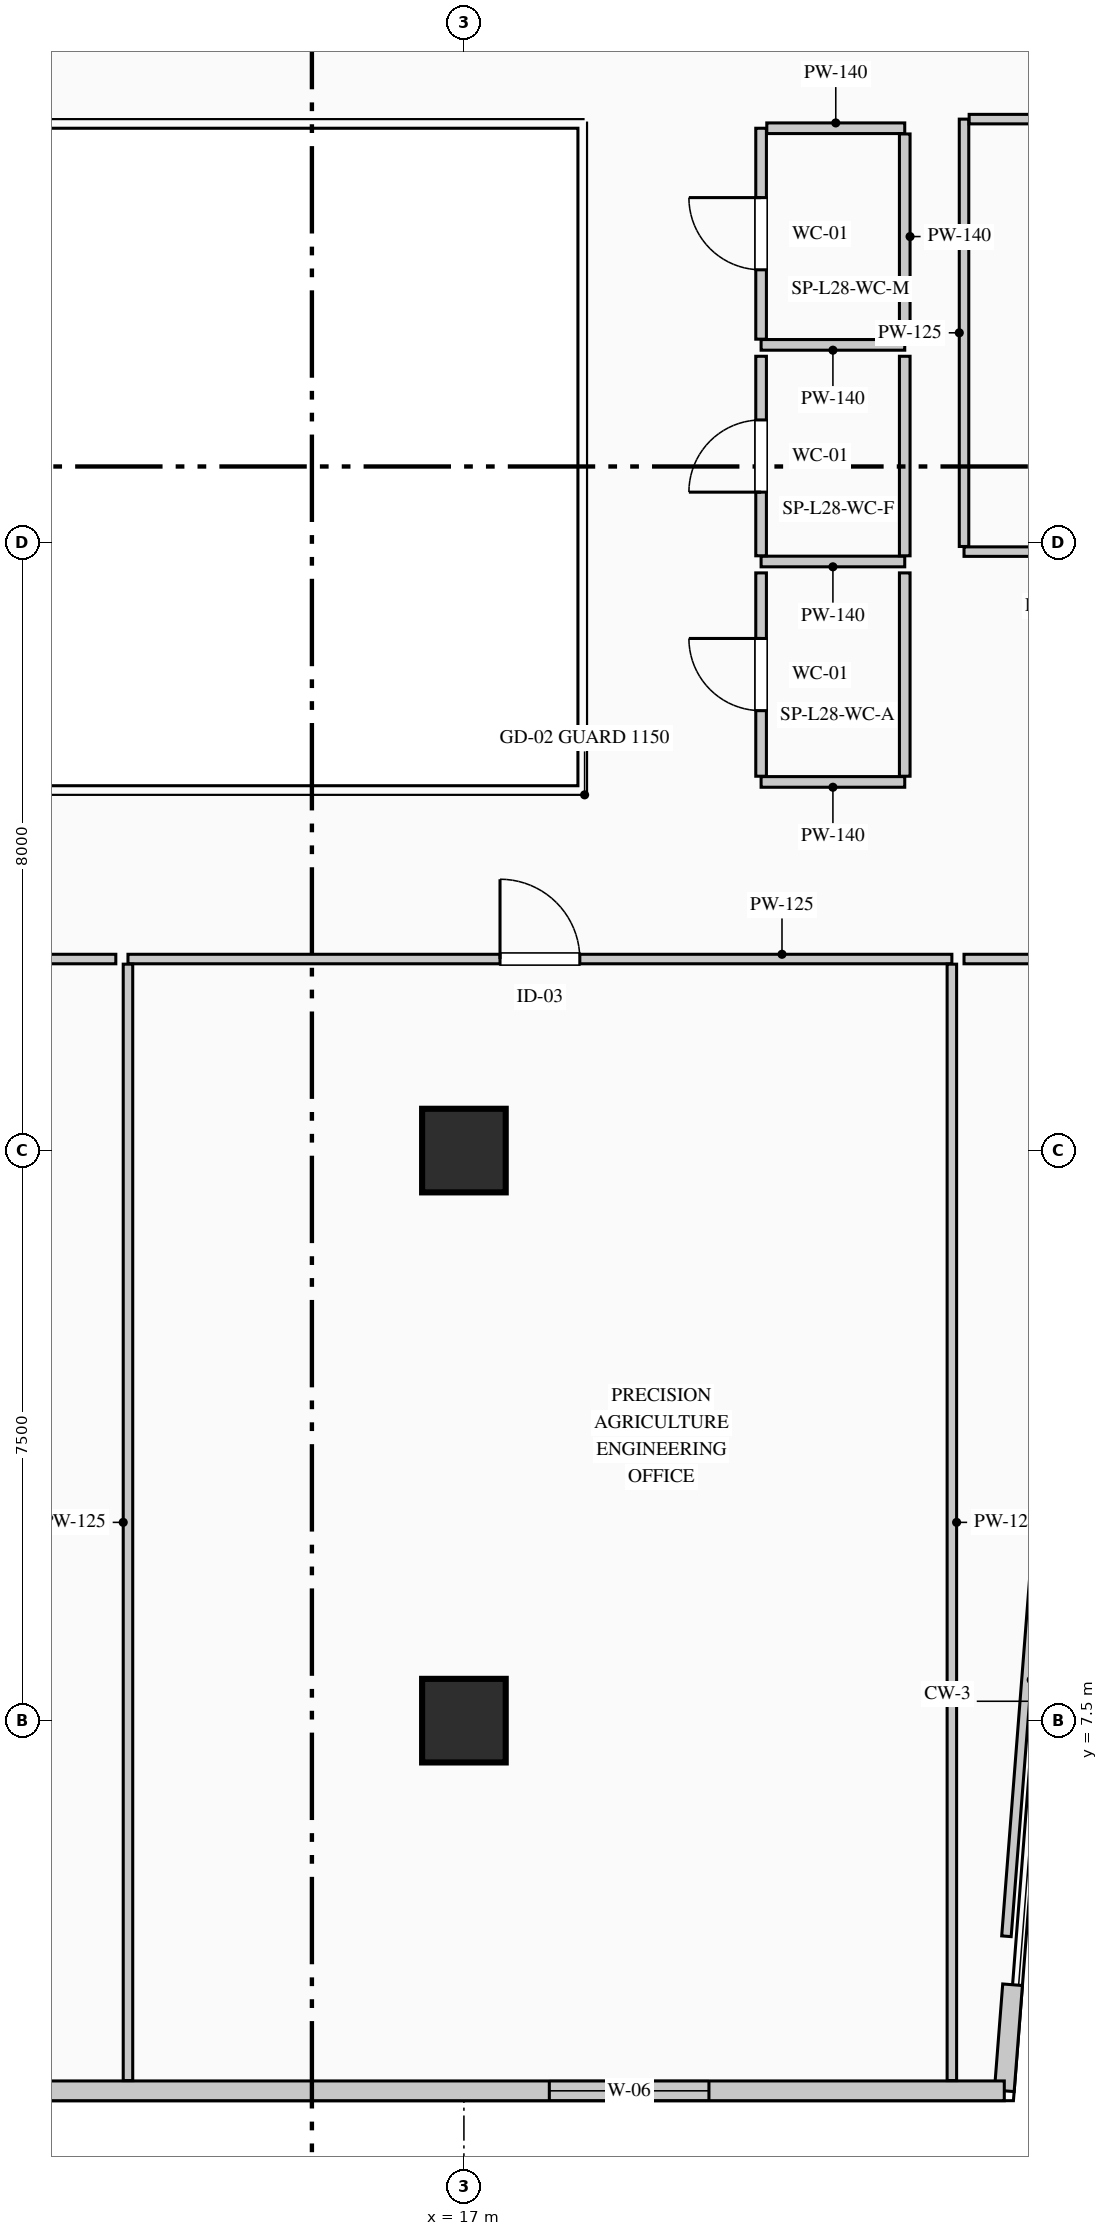
"""IFC4 building model, lengths in metres.
Left out: names, types, materials, properties, quantities, classifications, styles, units other than length and angle.
Written with IfcOpenShell. Run it as: python <this file> out.ifc"""

import sys

from ifc_helpers import new_model, si_unit, direction, frame, frame_2d, origin, origin_2d, place, context, subcontext, project, spatial, rectangle, extrude, element, fill, save


model = new_model("IFC4")
c1 = context("Model", 3, precision=1e-05, world=origin(), true_north=direction((0.0, 1.0)))
c2 = subcontext(c1, "Body", "Model", "MODEL_VIEW")
j1 = project(units=[si_unit("LENGTHUNIT", "METRE"), si_unit("PLANEANGLEUNIT", "RADIAN")], contexts=[c1])
p1 = place(None, origin())
s1 = spatial("IfcSite", under=j1, at=p1, CompositionType="ELEMENT")
p2 = place(p1, origin())
s2 = spatial("IfcBuilding", under=s1, at=p2, CompositionType="ELEMENT")
p3 = place(p2, frame((0.0, 0.0, 123.25)))
s3 = spatial("IfcBuildingStorey", under=s2, at=p3, CompositionType="ELEMENT", Elevation=123.25)
for number, where, z_axis, x_axis in (
    (1, (17.0, 7.5, 0.0), (0.0, 0.0, 1.0), (1.0, 0.0, 0.0)),
    (2, (17.0, 15.0, 0.0), (0.0, 0.0, 1.0), (1.0, 0.0, 0.0)),
):
    element("IfcColumn", number, at=place(p3, frame(where, z_axis=z_axis, x_axis=x_axis)), inside=s3, PredefinedType="COLUMN", context=c2, shape_type="SweptSolid", body=[
        extrude(rectangle(XDim=1.1, YDim=1.1, at=origin_2d()), origin(), (0.0, 0.0, 1.0), 3.95),
    ])
p4 = place(p3, frame((24.219, 4.026, 0.0), z_axis=(0.0, 0.0, 1.0), x_axis=(-0.077776627829, -0.996970810086, 0.0)))
e3 = element("IfcWall", 3, at=p4, inside=s3, PredefinedType="STANDARD", context=c2, shape_type="SweptSolid", body=[
    extrude(rectangle(XDim=1.4, YDim=0.26, at=frame_2d((0.7, 0.0))), origin(), (0.0, 0.0, 1.0), 3.69),
])
p5 = place(p3, frame((24.11, 2.63, 0.0), z_axis=(0.0, 0.0, 1.0), x_axis=(-1.0, 0.0, 0.0)))
e4 = element("IfcWall", 4, at=p5, inside=s3, PredefinedType="STANDARD", context=c2, shape_type="SweptSolid", body=[
    extrude(rectangle(XDim=13.71, YDim=0.26, at=frame_2d((6.855, 0.0))), origin(), (0.0, 0.0, 1.0), 3.69),
])
p6 = place(p5, frame((3.886, 0.0, 0.9)))
e5 = element("IfcOpeningElement", 5, at=p6, cuts=e4, PredefinedType="OPENING", context=c2, shape_type="SweptSolid", body=[
    extrude(rectangle(XDim=2.1, YDim=2.0, at=frame_2d((1.05, 1.0))), frame((0.0, 0.14, 0.0), z_axis=(0.0, -1.0, 0.0), x_axis=(1.0, 0.0, 0.0)), (0.0, 0.0, 1.0), 0.28),
])
p7 = place(p3, frame((22.8, 25.6, 0.0), z_axis=(0.0, 0.0, 1.0), x_axis=(-1.0, 0.0, 0.0)))
e6 = element("IfcWall", 6, at=p7, inside=s3, PredefinedType="PARTITIONING", context=c2, shape_type="SweptSolid", body=[
    extrude(rectangle(XDim=1.89, YDim=0.14, at=frame_2d((0.945, 0.0))), origin(), (0.0, 0.0, 1.0), 3.69),
])
p8 = place(p3, frame((20.91, 25.675, 0.0), z_axis=(0.0, 0.0, 1.0), x_axis=(0.0, 1.0, 0.0)))
e7 = element("IfcWall", 7, at=p8, inside=s3, PredefinedType="PARTITIONING", context=c2, shape_type="SweptSolid", body=[
    extrude(rectangle(XDim=2.775, YDim=0.14, at=frame_2d((1.387, 0.0))), origin(), (0.0, 0.0, 1.0), 3.69),
])
p9 = place(p8, frame((0.913, 0.0, 0.0)))
e8 = element("IfcOpeningElement", 8, at=p9, cuts=e7, PredefinedType="OPENING", context=c2, shape_type="SweptSolid", body=[
    extrude(rectangle(XDim=0.95, YDim=2.15, at=frame_2d((0.475, 1.075))), frame((0.0, 0.08, 0.0), z_axis=(0.0, -1.0, 0.0), x_axis=(1.0, 0.0, 0.0)), (0.0, 0.0, 1.0), 0.16),
])
p10 = place(p3, frame((20.985, 28.45, 0.0), z_axis=(0.0, 0.0, 1.0), x_axis=(1.0, 0.0, 0.0)))
e9 = element("IfcWall", 9, at=p10, inside=s3, PredefinedType="PARTITIONING", context=c2, shape_type="SweptSolid", body=[
    extrude(rectangle(XDim=1.815, YDim=0.14, at=frame_2d((0.907, 0.0))), origin(), (0.0, 0.0, 1.0), 3.69),
])
p11 = place(p3, frame((22.8, 28.375, 0.0), z_axis=(0.0, 0.0, 1.0), x_axis=(0.0, -1.0, 0.0)))
e10 = element("IfcWall", 10, at=p11, inside=s3, PredefinedType="PARTITIONING", context=c2, shape_type="SweptSolid", body=[
    extrude(rectangle(XDim=2.7, YDim=0.14, at=frame_2d((1.35, 0.0))), origin(), (0.0, 0.0, 1.0), 3.375),
])
p12 = place(p3, frame((22.8, 22.75, 0.0), z_axis=(0.0, 0.0, 1.0), x_axis=(-1.0, 0.0, 0.0)))
e11 = element("IfcWall", 11, at=p12, inside=s3, PredefinedType="PARTITIONING", context=c2, shape_type="SweptSolid", body=[
    extrude(rectangle(XDim=1.89, YDim=0.14, at=frame_2d((0.945, 0.0))), origin(), (0.0, 0.0, 1.0), 3.69),
])
p13 = place(p3, frame((20.91, 22.825, 0.0), z_axis=(0.0, 0.0, 1.0), x_axis=(0.0, 1.0, 0.0)))
e12 = element("IfcWall", 12, at=p13, inside=s3, PredefinedType="PARTITIONING", context=c2, shape_type="SweptSolid", body=[
    extrude(rectangle(XDim=2.625, YDim=0.14, at=frame_2d((1.312, 0.0))), origin(), (0.0, 0.0, 1.0), 3.69),
])
p14 = place(p13, frame((0.837, 0.0, 0.0)))
e13 = element("IfcOpeningElement", 13, at=p14, cuts=e12, PredefinedType="OPENING", context=c2, shape_type="SweptSolid", body=[
    extrude(rectangle(XDim=0.95, YDim=2.15, at=frame_2d((0.475, 1.075))), frame((0.0, 0.08, 0.0), z_axis=(0.0, -1.0, 0.0), x_axis=(1.0, 0.0, 0.0)), (0.0, 0.0, 1.0), 0.16),
])
p15 = place(p3, frame((22.8, 25.45, 0.0), z_axis=(0.0, 0.0, 1.0), x_axis=(0.0, -1.0, 0.0)))
e14 = element("IfcWall", 14, at=p15, inside=s3, PredefinedType="PARTITIONING", context=c2, shape_type="SweptSolid", body=[
    extrude(rectangle(XDim=2.625, YDim=0.14, at=frame_2d((1.312, 0.0))), origin(), (0.0, 0.0, 1.0), 3.375),
])
p16 = place(p3, frame((22.8, 19.85, 0.0), z_axis=(0.0, 0.0, 1.0), x_axis=(-1.0, 0.0, 0.0)))
e15 = element("IfcWall", 15, at=p16, inside=s3, PredefinedType="PARTITIONING", context=c2, shape_type="SweptSolid", body=[
    extrude(rectangle(XDim=1.89, YDim=0.14, at=frame_2d((0.945, 0.0))), origin(), (0.0, 0.0, 1.0), 3.69),
])
p17 = place(p3, frame((20.91, 19.925, 0.0), z_axis=(0.0, 0.0, 1.0), x_axis=(0.0, 1.0, 0.0)))
e16 = element("IfcWall", 16, at=p17, inside=s3, PredefinedType="PARTITIONING", context=c2, shape_type="SweptSolid", body=[
    extrude(rectangle(XDim=2.675, YDim=0.14, at=frame_2d((1.337, 0.0))), origin(), (0.0, 0.0, 1.0), 3.69),
])
p18 = place(p17, frame((0.863, 0.0, 0.0)))
e17 = element("IfcOpeningElement", 17, at=p18, cuts=e16, PredefinedType="OPENING", context=c2, shape_type="SweptSolid", body=[
    extrude(rectangle(XDim=0.95, YDim=2.15, at=frame_2d((0.475, 1.075))), frame((0.0, 0.08, 0.0), z_axis=(0.0, -1.0, 0.0), x_axis=(1.0, 0.0, 0.0)), (0.0, 0.0, 1.0), 0.16),
])
p19 = place(p3, frame((22.8, 22.6, 0.0), z_axis=(0.0, 0.0, 1.0), x_axis=(0.0, -1.0, 0.0)))
e18 = element("IfcWall", 18, at=p19, inside=s3, PredefinedType="PARTITIONING", context=c2, shape_type="SweptSolid", body=[
    extrude(rectangle(XDim=2.675, YDim=0.14, at=frame_2d((1.337, 0.0))), origin(), (0.0, 0.0, 1.0), 3.375),
])
p20 = place(p3, frame((12.58, 17.52, 0.0), z_axis=(0.0, 0.0, 1.0), x_axis=(1.0, 0.0, 0.0)))
e19 = element("IfcWall", 19, at=p20, inside=s3, PredefinedType="PARTITIONING", context=c2, shape_type="SweptSolid", body=[
    extrude(rectangle(XDim=10.84, YDim=0.125, at=frame_2d((5.42, 0.0))), origin(), (0.0, 0.0, 1.0), 3.69),
])
p21 = place(p20, frame((4.895, 0.0, 0.0)))
e20 = element("IfcOpeningElement", 20, at=p21, cuts=e19, PredefinedType="OPENING", context=c2, shape_type="SweptSolid", body=[
    extrude(rectangle(XDim=1.05, YDim=2.15, at=frame_2d((0.525, 1.075))), frame((0.0, 0.073, 0.0), z_axis=(0.0, -1.0, 0.0), x_axis=(1.0, 0.0, 0.0)), (0.0, 0.0, 1.0), 0.145),
])
for number, where, z_axis, x_axis in (
    (21, (23.42, 17.452, 0.0), (0.0, 0.0, 1.0), (0.0, -1.0, 0.0)),
    (22, (12.58, 2.765, 0.0), (0.0, 0.0, 1.0), (0.0, 1.0, 0.0)),
):
    element("IfcWall", number, at=place(p3, frame(where, z_axis=z_axis, x_axis=x_axis)), inside=s3, PredefinedType="PARTITIONING", context=c2, shape_type="SweptSolid", body=[
        extrude(rectangle(XDim=14.688, YDim=0.125, at=frame_2d((7.344, 0.0))), origin(), (0.0, 0.0, 1.0), 3.69),
    ])
p22 = place(p3, frame((6.36, 17.52, 0.0), z_axis=(0.0, 0.0, 1.0), x_axis=(1.0, 0.0, 0.0)))
e23 = element("IfcWall", 23, at=p22, inside=s3, PredefinedType="PARTITIONING", context=c2, shape_type="SweptSolid", body=[
    extrude(rectangle(XDim=6.06, YDim=0.125, at=frame_2d((3.03, 0.0))), origin(), (0.0, 0.0, 1.0), 3.69),
])
p23 = place(p22, frame((2.505, 0.0, 0.0)))
e24 = element("IfcOpeningElement", 24, at=p23, cuts=e23, PredefinedType="OPENING", context=c2, shape_type="SweptSolid", body=[
    extrude(rectangle(XDim=1.05, YDim=2.15, at=frame_2d((0.525, 1.075))), frame((0.0, 0.073, 0.0), z_axis=(0.0, -1.0, 0.0), x_axis=(1.0, 0.0, 0.0)), (0.0, 0.0, 1.0), 0.145),
])
p24 = place(p3, frame((24.666, 11.42, 0.0), z_axis=(0.0, 0.0, 1.0), x_axis=(-0.077847945506, -0.996965243818, 0.0)))
e25 = element("IfcWall", 25, at=p24, inside=s3, PredefinedType="PARTITIONING", context=c2, shape_type="SweptSolid", body=[
    extrude(rectangle(XDim=6.777, YDim=0.125, at=frame_2d((3.389, 0.0))), origin(), (0.0, 0.0, 1.0), 3.69),
])
p25 = place(p3, frame((23.58, 17.52, 0.0), z_axis=(0.0, 0.0, 1.0), x_axis=(1.0, 0.0, 0.0)))
e26 = element("IfcWall", 26, at=p25, inside=s3, PredefinedType="PARTITIONING", context=c2, shape_type="SweptSolid", body=[
    extrude(rectangle(XDim=9.84, YDim=0.125, at=frame_2d((4.92, 0.0))), origin(), (0.0, 0.0, 1.0), 3.375),
])
p26 = place(p25, frame((4.395, 0.0, 0.0)))
e27 = element("IfcOpeningElement", 27, at=p26, cuts=e26, PredefinedType="OPENING", context=c2, shape_type="SweptSolid", body=[
    extrude(rectangle(XDim=1.05, YDim=2.15, at=frame_2d((0.525, 1.075))), frame((0.0, 0.073, 0.0), z_axis=(0.0, -1.0, 0.0), x_axis=(1.0, 0.0, 0.0)), (0.0, 0.0, 1.0), 0.145),
])
p27 = place(p3, frame((26.025, 22.88, 0.0), z_axis=(0.0, 0.0, 1.0), x_axis=(-1.0, 0.0, 0.0)))
e28 = element("IfcWall", 28, at=p27, inside=s3, PredefinedType="PARTITIONING", context=c2, shape_type="SweptSolid", body=[
    extrude(rectangle(XDim=2.445, YDim=0.125, at=frame_2d((1.222, 0.0))), origin(), (0.0, 0.0, 1.0), 3.69),
])
p28 = place(p3, frame((23.58, 22.948, 0.0), z_axis=(0.0, 0.0, 1.0), x_axis=(0.0, 1.0, 0.0)))
e29 = element("IfcWall", 29, at=p28, inside=s3, PredefinedType="PARTITIONING", context=c2, shape_type="SweptSolid", body=[
    extrude(rectangle(XDim=5.623, YDim=0.125, at=frame_2d((2.811, 0.0))), origin(), (0.0, 0.0, 1.0), 3.69),
])
p29 = place(p3, frame((23.647, 28.57, 0.0), z_axis=(0.0, 0.0, 1.0), x_axis=(1.0, 0.0, 0.0)))
e30 = element("IfcWall", 30, at=p29, inside=s3, PredefinedType="PARTITIONING", context=c2, shape_type="SweptSolid", body=[
    extrude(rectangle(XDim=9.772, YDim=0.125, at=frame_2d((4.886, 0.0))), origin(), (0.0, 0.0, 1.0), 3.375),
])
p30 = place(p29, frame((4.361, 0.0, 0.0)))
e31 = element("IfcOpeningElement", 31, at=p30, cuts=e30, PredefinedType="OPENING", context=c2, shape_type="SweptSolid", body=[
    extrude(rectangle(XDim=1.05, YDim=2.15, at=frame_2d((0.525, 1.075))), frame((0.0, 0.073, 0.0), z_axis=(0.0, -1.0, 0.0), x_axis=(1.0, 0.0, 0.0)), (0.0, 0.0, 1.0), 0.145),
])
p31 = place(p6, origin())
e32 = element("IfcWindow", 32, at=p31, inside=s3, PartitioningType="DOUBLE_PANEL_VERTICAL", PredefinedType="WINDOW", context=c2, shape_type="SweptSolid", body=[
    extrude(rectangle(XDim=2.1, YDim=2.0, at=frame_2d((1.05, 1.0))), frame((0.0, 0.03, 0.0), z_axis=(0.0, -1.0, 0.0), x_axis=(1.0, 0.0, 0.0)), (0.0, 0.0, 1.0), 0.06),
])
fill(e5, e32)
p32 = place(p9, origin())
e33 = element("IfcDoor", 33, at=p32, inside=s3, OperationType="SINGLE_SWING_RIGHT", PredefinedType="DOOR", context=c2, shape_type="SweptSolid", body=[
    extrude(rectangle(XDim=0.95, YDim=2.15, at=frame_2d((0.475, 1.075))), frame((0.0, 0.025, 0.0), z_axis=(0.0, -1.0, 0.0), x_axis=(1.0, 0.0, 0.0)), (0.0, 0.0, 1.0), 0.05),
])
fill(e8, e33)
p33 = place(p14, origin())
e34 = element("IfcDoor", 34, at=p33, inside=s3, OperationType="SINGLE_SWING_LEFT", PredefinedType="DOOR", context=c2, shape_type="SweptSolid", body=[
    extrude(rectangle(XDim=0.95, YDim=2.15, at=frame_2d((0.475, 1.075))), frame((0.0, 0.025, 0.0), z_axis=(0.0, -1.0, 0.0), x_axis=(1.0, 0.0, 0.0)), (0.0, 0.0, 1.0), 0.05),
])
fill(e13, e34)
p34 = place(p18, origin())
e35 = element("IfcDoor", 35, at=p34, inside=s3, OperationType="SINGLE_SWING_RIGHT", PredefinedType="DOOR", context=c2, shape_type="SweptSolid", body=[
    extrude(rectangle(XDim=0.95, YDim=2.15, at=frame_2d((0.475, 1.075))), frame((0.0, 0.025, 0.0), z_axis=(0.0, -1.0, 0.0), x_axis=(1.0, 0.0, 0.0)), (0.0, 0.0, 1.0), 0.05),
])
fill(e17, e35)
p35 = place(p21, origin())
e36 = element("IfcDoor", 36, at=p35, inside=s3, OperationType="SINGLE_SWING_LEFT", PredefinedType="DOOR", context=c2, shape_type="SweptSolid", body=[
    extrude(rectangle(XDim=1.05, YDim=2.15, at=frame_2d((0.525, 1.075))), frame((0.0, 0.025, 0.0), z_axis=(0.0, -1.0, 0.0), x_axis=(1.0, 0.0, 0.0)), (0.0, 0.0, 1.0), 0.05),
])
fill(e20, e36)
save(model, sys.argv[1])
